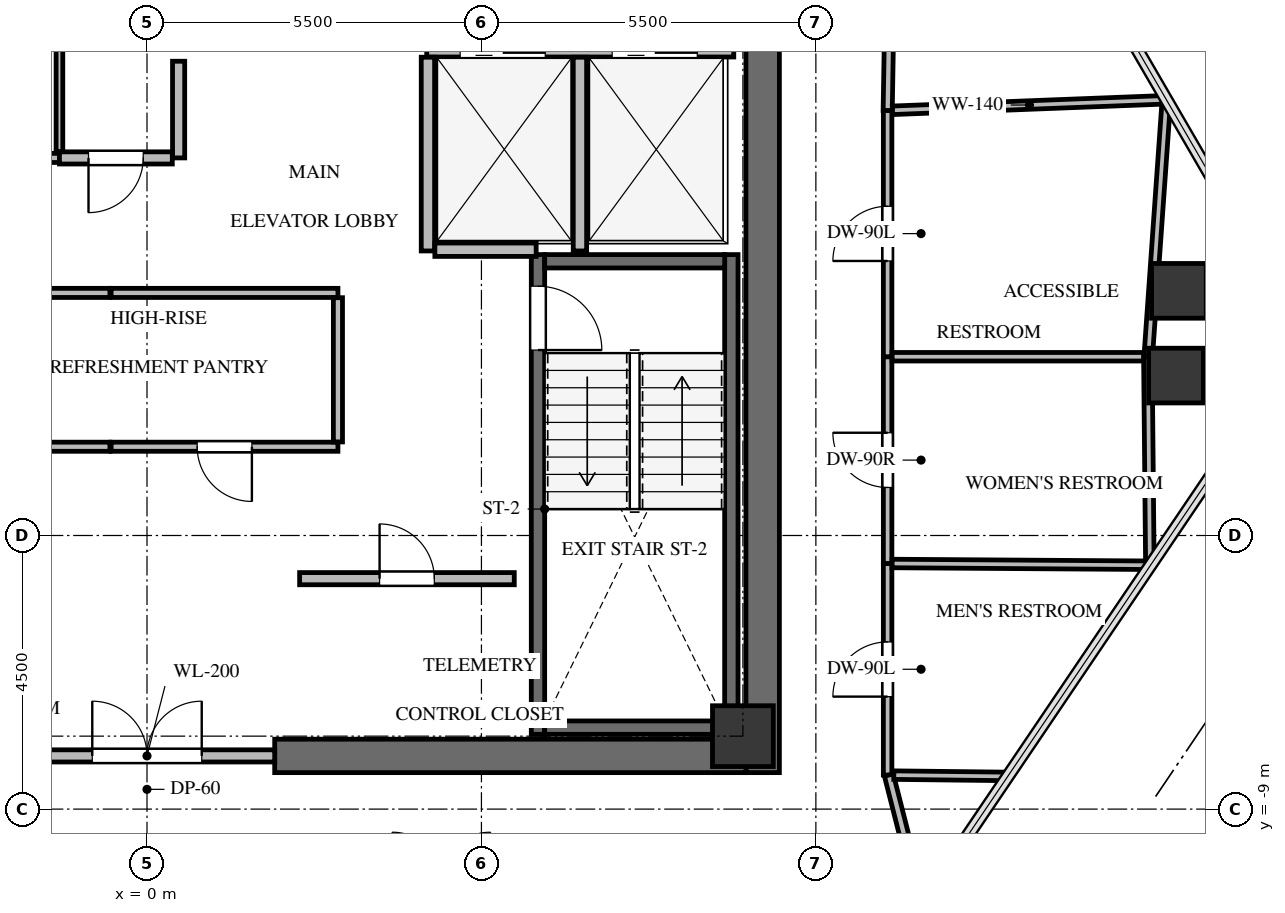
"""IFC4 building model, lengths in metres.
Left out: names, types, materials, properties, quantities, classifications, styles, units other than length and angle.
Written with IfcOpenShell. Run it as: python <this file> out.ifc"""

import sys

from ifc_helpers import new_model, si_unit, direction, frame, frame_2d, origin, origin_2d, place, context, subcontext, project, spatial, rectangle, extrude, source, transform, mapped, element, fill, save


model = new_model("IFC4")
c1 = context("Model", 3, precision=1e-05, world=origin(), true_north=direction((0.0, 1.0)))
c2 = subcontext(c1, "Body", "Model", "MODEL_VIEW")
j1 = project(units=[si_unit("LENGTHUNIT", "METRE"), si_unit("PLANEANGLEUNIT", "RADIAN")], contexts=[c1])
p1 = place(None, origin())
s1 = spatial("IfcSite", under=j1, at=p1, CompositionType="ELEMENT")
p2 = place(p1, origin())
s2 = spatial("IfcBuilding", under=s1, at=p2, CompositionType="ELEMENT")
p3 = place(p2, frame((0.0, 0.0, 244.7)))
s3 = spatial("IfcBuildingStorey", under=s2, at=p3, CompositionType="ELEMENT", Elevation=244.7)
p4 = place(p3, frame((10.125, -8.4, 0.0), z_axis=(0.0, 0.0, 1.0), x_axis=(0.0, 1.0, 0.0)))
e1 = element("IfcWall", 1, at=p4, inside=s3, PredefinedType="SHEAR", context=c2, shape_type="SweptSolid", body=[
    extrude(rectangle(XDim=16.8, YDim=0.55, at=frame_2d((8.4, 0.0))), origin(), (0.0, 0.0, 1.0), 3.3),
])
p5 = place(p3, frame((2.1, -8.125, 0.0), z_axis=(0.0, 0.0, 1.0), x_axis=(1.0, 0.0, 0.0)))
e2 = element("IfcWall", 2, at=p5, inside=s3, PredefinedType="SHEAR", context=c2, shape_type="SweptSolid", body=[
    extrude(rectangle(XDim=7.75, YDim=0.55, at=frame_2d((3.875, 0.0))), origin(), (0.0, 0.0, 1.0), 3.3),
])
p6 = place(p3, frame((9.61, -7.77, -0.24), z_axis=(0.0, 0.0, 1.0), x_axis=(0.0, 1.0, 0.0)))
e3 = element("IfcWall", 3, at=p6, inside=s3, PredefinedType="SHEAR", context=c2, shape_type="SweptSolid", body=[
    extrude(rectangle(XDim=7.89, YDim=0.22, at=frame_2d((3.945, 0.0))), origin(), (0.0, 0.0, 1.0), 3.3),
])
p7 = place(p3, frame((6.43, 0.12, -0.24), z_axis=(0.0, 0.0, 1.0), x_axis=(0.0, -1.0, 0.0)))
e4 = element("IfcWall", 4, at=p7, inside=s3, PredefinedType="SHEAR", context=c2, shape_type="SweptSolid", body=[
    extrude(rectangle(XDim=7.89, YDim=0.22, at=frame_2d((3.945, 0.0))), origin(), (0.0, 0.0, 1.0), 3.3),
])
p8 = place(p7, frame((0.52, 0.0, 0.0)))
e5 = element("IfcOpeningElement", 5, at=p8, cuts=e4, PredefinedType="OPENING", context=c2, shape_type="SweptSolid", body=[
    extrude(rectangle(XDim=1.05, YDim=2.15, at=frame_2d((0.525, 1.075))), frame((0.0, 0.12, 0.0), z_axis=(0.0, -1.0, 0.0), x_axis=(1.0, 0.0, 0.0)), (0.0, 0.0, 1.0), 0.24),
])
for number, where, z_axis, x_axis in (
    (6, (6.54, -7.66, -0.24), (0.0, 0.0, 1.0), (1.0, 0.0, 0.0)),
    (7, (9.5, 0.01, -0.24), (0.0, 0.0, 1.0), (-1.0, 0.0, 0.0)),
):
    element("IfcWall", number, at=place(p3, frame(where, z_axis=z_axis, x_axis=x_axis)), inside=s3, PredefinedType="SHEAR", context=c2, shape_type="SweptSolid", body=[
        extrude(rectangle(XDim=2.96, YDim=0.22, at=frame_2d((1.48, 0.0))), origin(), (0.0, 0.0, 1.0), 3.3),
    ])
m1 = source(origin(), c2, "Body", "SweptSolid", [
    extrude(rectangle(XDim=1.0, YDim=1.0, at=origin_2d()), origin(), (0.0, 0.0, 1.0), 3.3),
])
p9 = place(p3, frame((9.8, -7.8, -0.24), z_axis=(0.0, 0.0, 1.0), x_axis=(1.0, 0.0, 0.0)))
e8 = element("IfcColumn", 8, at=p9, inside=s3, PredefinedType="COLUMN", context=c2, shape_type="MappedRepresentation", body=[
    mapped(m1, transform((0.0, 0.0, 0.0), x_axis=(1.0, 0.0, 0.0), y_axis=(0.0, 1.0, 0.0), z_axis=(0.0, 0.0, 1.0), scale=1.0)),
])
m2 = source(origin(), c2, "Body", "SweptSolid", [
    extrude(rectangle(XDim=0.9, YDim=0.9, at=origin_2d()), origin(), (0.0, 0.0, 1.0), 3.3),
])
for number, where, z_axis, x_axis in (
    (9, (16.97, -0.476, -0.24), (0.0, 0.0, 1.0), (1.0, 0.0, 0.0)),
    (10, (16.922, -1.87, -0.24), (0.0, 0.0, 1.0), (1.0, 0.0, 0.0)),
):
    element("IfcColumn", number, at=place(p3, frame(where, z_axis=z_axis, x_axis=x_axis)), inside=s3, PredefinedType="COLUMN", context=c2, shape_type="MappedRepresentation", body=[
        mapped(m2, transform((0.0, 0.0, 0.0), x_axis=(1.0, 0.0, 0.0), y_axis=(0.0, 1.0, 0.0), z_axis=(0.0, 0.0, 1.0), scale=1.0)),
    ])
p10 = place(p3, frame((-2.1, -8.125, 0.0), z_axis=(0.0, 0.0, 1.0), x_axis=(1.0, 0.0, 0.0)))
e11 = element("IfcWall", 11, at=p10, inside=s3, PredefinedType="SOLIDWALL", context=c2, shape_type="SweptSolid", body=[
    extrude(rectangle(XDim=4.2, YDim=0.2, at=frame_2d((2.1, 0.0))), origin(), (0.0, 0.0, 1.0), 3.045),
])
p11 = place(p10, frame((1.2, 0.0, 0.0)))
e12 = element("IfcOpeningElement", 12, at=p11, cuts=e11, PredefinedType="OPENING", context=c2, shape_type="SweptSolid", body=[
    extrude(rectangle(XDim=1.8, YDim=2.15, at=frame_2d((0.9, 1.075))), frame((0.0, 0.11, 0.0), z_axis=(0.0, -1.0, 0.0), x_axis=(1.0, 0.0, 0.0)), (0.0, 0.0, 1.0), 0.22),
])
p12 = place(p3, frame((4.6, 3.48, 0.0), z_axis=(0.0, 0.0, 1.0), x_axis=(1.0, 0.0, 0.0)))
e13 = element("IfcWall", 13, at=p12, inside=s3, PredefinedType="SOLIDWALL", context=c2, shape_type="SweptSolid", body=[
    extrude(rectangle(XDim=5.05, YDim=0.22, at=frame_2d((2.525, 0.0))), origin(), (0.0, 0.0, 1.0), 3.045),
])
p13 = place(p12, frame((0.55, 0.0, 0.0)))
e14 = element("IfcOpeningElement", 14, at=p13, cuts=e13, PredefinedType="OPENING", context=c2, shape_type="SweptSolid", body=[
    extrude(rectangle(XDim=1.4, YDim=2.15, at=frame_2d((0.7, 1.075))), frame((0.0, 0.12, 0.0), z_axis=(0.0, -1.0, 0.0), x_axis=(1.0, 0.0, 0.0)), (0.0, 0.0, 1.0), 0.24),
])
p14 = place(p12, frame((3.05, 0.0, 0.0)))
e15 = element("IfcOpeningElement", 15, at=p14, cuts=e13, PredefinedType="OPENING", context=c2, shape_type="SweptSolid", body=[
    extrude(rectangle(XDim=1.4, YDim=2.15, at=frame_2d((0.7, 1.075))), frame((0.0, 0.12, 0.0), z_axis=(0.0, -1.0, 0.0), x_axis=(1.0, 0.0, 0.0)), (0.0, 0.0, 1.0), 0.24),
])
for number, where, z_axis, x_axis in (
    (16, (4.62, 0.18, 0.0), (0.0, 0.0, 1.0), (0.0, 1.0, 0.0)),
    (17, (7.12, 0.18, 0.0), (0.0, 0.0, 1.0), (0.0, 1.0, 0.0)),
):
    element("IfcWall", number, at=place(p3, frame(where, z_axis=z_axis, x_axis=x_axis)), inside=s3, PredefinedType="SOLIDWALL", context=c2, shape_type="SweptSolid", body=[
        extrude(rectangle(XDim=3.186, YDim=0.22, at=frame_2d((1.593, 0.0))), origin(), (0.0, 0.0, 1.0), 3.045),
    ])
p15 = place(p3, frame((4.734, 0.2, 0.0), z_axis=(0.0, 0.0, 1.0), x_axis=(1.0, 0.0, 0.0)))
e18 = element("IfcWall", 18, at=p15, inside=s3, PredefinedType="SOLIDWALL", context=c2, shape_type="SweptSolid", body=[
    extrude(rectangle(XDim=1.666, YDim=0.22, at=frame_2d((0.833, 0.0))), origin(), (0.0, 0.0, 1.0), 3.045),
])
p16 = place(p3, frame((2.51, -5.21, 0.0), z_axis=(0.0, 0.0, 1.0), x_axis=(1.0, 0.0, 0.0)))
e19 = element("IfcWall", 19, at=p16, inside=s3, PredefinedType="SOLIDWALL", context=c2, shape_type="SweptSolid", body=[
    extrude(rectangle(XDim=3.53, YDim=0.2, at=frame_2d((1.765, 0.0))), origin(), (0.0, 0.0, 1.0), 3.045),
])
p17 = place(p16, frame((1.315, 0.0, 0.0)))
e20 = element("IfcOpeningElement", 20, at=p17, cuts=e19, PredefinedType="OPENING", context=c2, shape_type="SweptSolid", body=[
    extrude(rectangle(XDim=0.9, YDim=2.05, at=frame_2d((0.45, 1.025))), frame((0.0, 0.11, 0.0), z_axis=(0.0, -1.0, 0.0), x_axis=(1.0, 0.0, 0.0)), (0.0, 0.0, 1.0), 0.22),
])
p18 = place(p3, frame((-0.61, -3.04, 0.0), z_axis=(0.0, 0.0, 1.0), x_axis=(-1.0, 0.0, 0.0)))
e21 = element("IfcWall", 21, at=p18, inside=s3, PredefinedType="PARTITIONING", context=c2, shape_type="SweptSolid", body=[
    extrude(rectangle(XDim=3.73, YDim=0.15, at=frame_2d((1.865, 0.0))), origin(), (0.0, 0.0, 1.0), 3.045),
])
p19 = place(p18, frame((1.415, 0.0, 0.0)))
e22 = element("IfcOpeningElement", 22, at=p19, cuts=e21, PredefinedType="OPENING", context=c2, shape_type="SweptSolid", body=[
    extrude(rectangle(XDim=0.9, YDim=2.05, at=frame_2d((0.45, 1.025))), frame((0.0, 0.085, 0.0), z_axis=(0.0, -1.0, 0.0), x_axis=(1.0, 0.0, 0.0)), (0.0, 0.0, 1.0), 0.17),
])
p20 = place(p3, frame((-4.34, -0.51, 0.0), z_axis=(0.0, 0.0, 1.0), x_axis=(1.0, 0.0, 0.0)))
e23 = element("IfcWall", 23, at=p20, inside=s3, PredefinedType="PARTITIONING", context=c2, shape_type="SweptSolid", body=[
    extrude(rectangle(XDim=3.73, YDim=0.15, at=frame_2d((1.865, 0.0))), origin(), (0.0, 0.0, 1.0), 3.045),
])
p21 = place(p3, frame((3.14, -3.04, 0.0), z_axis=(0.0, 0.0, 1.0), x_axis=(-1.0, 0.0, 0.0)))
e24 = element("IfcWall", 24, at=p21, inside=s3, PredefinedType="PARTITIONING", context=c2, shape_type="SweptSolid", body=[
    extrude(rectangle(XDim=3.73, YDim=0.15, at=frame_2d((1.865, 0.0))), origin(), (0.0, 0.0, 1.0), 3.045),
])
p22 = place(p21, frame((1.415, 0.0, 0.0)))
e25 = element("IfcOpeningElement", 25, at=p22, cuts=e24, PredefinedType="OPENING", context=c2, shape_type="SweptSolid", body=[
    extrude(rectangle(XDim=0.9, YDim=2.05, at=frame_2d((0.45, 1.025))), frame((0.0, 0.085, 0.0), z_axis=(0.0, -1.0, 0.0), x_axis=(1.0, 0.0, 0.0)), (0.0, 0.0, 1.0), 0.17),
])
p23 = place(p3, frame((-0.59, -0.51, 0.0), z_axis=(0.0, 0.0, 1.0), x_axis=(1.0, 0.0, 0.0)))
e26 = element("IfcWall", 26, at=p23, inside=s3, PredefinedType="PARTITIONING", context=c2, shape_type="SweptSolid", body=[
    extrude(rectangle(XDim=3.73, YDim=0.15, at=frame_2d((1.865, 0.0))), origin(), (0.0, 0.0, 1.0), 3.045),
])
p24 = place(p3, frame((3.14, -0.589, 0.0), z_axis=(0.0, 0.0, 1.0), x_axis=(0.0, -1.0, 0.0)))
e27 = element("IfcWall", 27, at=p24, inside=s3, PredefinedType="PARTITIONING", context=c2, shape_type="SweptSolid", body=[
    extrude(rectangle(XDim=2.372, YDim=0.15, at=frame_2d((1.186, 0.0))), origin(), (0.0, 0.0, 1.0), 3.045),
])
p25 = place(p3, frame((-1.44, 1.71, 0.0), z_axis=(0.0, 0.0, 1.0), x_axis=(-1.0, 0.0, 0.0)))
e28 = element("IfcWall", 28, at=p25, inside=s3, PredefinedType="PARTITIONING", context=c2, shape_type="SweptSolid", body=[
    extrude(rectangle(XDim=1.96, YDim=0.15, at=frame_2d((0.98, 0.0))), origin(), (0.0, 0.0, 1.0), 3.045),
])
p26 = place(p25, frame((0.53, 0.0, 0.0)))
e29 = element("IfcOpeningElement", 29, at=p26, cuts=e28, PredefinedType="OPENING", context=c2, shape_type="SweptSolid", body=[
    extrude(rectangle(XDim=0.9, YDim=2.05, at=frame_2d((0.45, 1.025))), frame((0.0, 0.085, 0.0), z_axis=(0.0, -1.0, 0.0), x_axis=(1.0, 0.0, 0.0)), (0.0, 0.0, 1.0), 0.17),
])
p27 = place(p3, frame((0.52, 3.3, 0.0), z_axis=(0.0, 0.0, 1.0), x_axis=(0.0, -1.0, 0.0)))
e30 = element("IfcWall", 30, at=p27, inside=s3, PredefinedType="SOLIDWALL", context=c2, shape_type="SweptSolid", body=[
    extrude(rectangle(XDim=1.59, YDim=0.2, at=frame_2d((0.795, 0.0))), origin(), (0.0, 0.0, 1.0), 3.045),
])
p28 = place(p3, frame((0.416, 1.71, 0.0), z_axis=(0.0, 0.0, 1.0), x_axis=(-1.0, 0.0, 0.0)))
e31 = element("IfcWall", 31, at=p28, inside=s3, PredefinedType="SOLIDWALL", context=c2, shape_type="SweptSolid", body=[
    extrude(rectangle(XDim=1.856, YDim=0.2, at=frame_2d((0.928, 0.0))), origin(), (0.0, 0.0, 1.0), 3.045),
])
p29 = place(p28, frame((0.478, 0.0, 0.0)))
e32 = element("IfcOpeningElement", 32, at=p29, cuts=e31, PredefinedType="OPENING", context=c2, shape_type="SweptSolid", body=[
    extrude(rectangle(XDim=0.9, YDim=2.05, at=frame_2d((0.45, 1.025))), frame((0.0, 0.11, 0.0), z_axis=(0.0, -1.0, 0.0), x_axis=(1.0, 0.0, 0.0)), (0.0, 0.0, 1.0), 0.22),
])
p30 = place(p3, frame((12.18, -8.44, 0.0), z_axis=(0.0, 0.0, 1.0), x_axis=(0.0, 1.0, 0.0)))
e33 = element("IfcWall", 33, at=p30, inside=s3, PredefinedType="PARTITIONING", context=c2, shape_type="SweptSolid", body=[
    extrude(rectangle(XDim=3.48, YDim=0.14, at=frame_2d((1.74, 0.0))), origin(), (0.0, 0.0, 1.0), 2.399),
])
p31 = place(p30, frame((1.29, 0.0, 0.0)))
e34 = element("IfcOpeningElement", 34, at=p31, cuts=e33, PredefinedType="OPENING", context=c2, shape_type="SweptSolid", body=[
    extrude(rectangle(XDim=0.9, YDim=2.05, at=frame_2d((0.45, 1.025))), frame((0.0, 0.08, 0.0), z_axis=(0.0, -1.0, 0.0), x_axis=(1.0, 0.0, 0.0)), (0.0, 0.0, 1.0), 0.16),
])
p32 = place(p3, frame((12.18, -4.96, 0.0), z_axis=(0.0, 0.0, 1.0), x_axis=(0.0, 1.0, 0.0)))
e35 = element("IfcWall", 35, at=p32, inside=s3, PredefinedType="PARTITIONING", context=c2, shape_type="SweptSolid", body=[
    extrude(rectangle(XDim=3.4, YDim=0.14, at=frame_2d((1.7, 0.0))), origin(), (0.0, 0.0, 1.0), 3.045),
])
p33 = place(p32, frame((1.25, 0.0, 0.0)))
e36 = element("IfcOpeningElement", 36, at=p33, cuts=e35, PredefinedType="OPENING", context=c2, shape_type="SweptSolid", body=[
    extrude(rectangle(XDim=0.9, YDim=2.05, at=frame_2d((0.45, 1.025))), frame((0.0, 0.08, 0.0), z_axis=(0.0, -1.0, 0.0), x_axis=(1.0, 0.0, 0.0)), (0.0, 0.0, 1.0), 0.16),
])
p34 = place(p3, frame((12.18, -1.56, 0.0), z_axis=(0.0, 0.0, 1.0), x_axis=(0.0, 1.0, 0.0)))
e37 = element("IfcWall", 37, at=p34, inside=s3, PredefinedType="PARTITIONING", context=c2, shape_type="SweptSolid", body=[
    extrude(rectangle(XDim=4.05, YDim=0.14, at=frame_2d((2.025, 0.0))), origin(), (0.0, 0.0, 1.0), 2.301),
])
p35 = place(p34, frame((1.575, 0.0, 0.0)))
e38 = element("IfcOpeningElement", 38, at=p35, cuts=e37, PredefinedType="OPENING", context=c2, shape_type="SweptSolid", body=[
    extrude(rectangle(XDim=0.9, YDim=2.05, at=frame_2d((0.45, 1.025))), frame((0.0, 0.08, 0.0), z_axis=(0.0, -1.0, 0.0), x_axis=(1.0, 0.0, 0.0)), (0.0, 0.0, 1.0), 0.16),
])
p36 = place(p3, frame((12.719, -10.477, 0.0), z_axis=(0.0, 0.0, 1.0), x_axis=(-0.246550381988, 0.96912997536, 0.0)))
e39 = element("IfcWall", 39, at=p36, inside=s3, PredefinedType="PARTITIONING", context=c2, shape_type="SweptSolid", body=[
    extrude(rectangle(XDim=2.102, YDim=0.15, at=frame_2d((1.051, 0.0))), origin(), (0.0, 0.0, 1.0), 2.399),
])
p37 = place(p3, frame((12.181, 2.49, 0.0), z_axis=(0.0, 0.0, 1.0), x_axis=(0.016828134389, 0.999858396921, 0.0)))
e40 = element("IfcWall", 40, at=p37, inside=s3, PredefinedType="PARTITIONING", context=c2, shape_type="SweptSolid", body=[
    extrude(rectangle(XDim=7.675, YDim=0.15, at=frame_2d((3.837, 0.0))), origin(), (0.0, 0.0, 1.0), 2.399),
])
p38 = place(p37, frame((3.362, 0.0, 0.0)))
e41 = element("IfcOpeningElement", 41, at=p38, cuts=e40, PredefinedType="OPENING", context=c2, shape_type="SweptSolid", body=[
    extrude(rectangle(XDim=0.95, YDim=2.1, at=frame_2d((0.475, 1.05))), frame((0.0, 0.085, 0.0), z_axis=(0.0, -1.0, 0.0), x_axis=(1.0, 0.0, 0.0)), (0.0, 0.0, 1.0), 0.17),
])
p39 = place(p3, frame((-1.44, 4.375, 0.0), z_axis=(0.0, 0.0, 1.0), x_axis=(0.0, -1.0, 0.0)))
e42 = element("IfcWall", 42, at=p39, inside=s3, PredefinedType="MOVABLE", context=c2, shape_type="SweptSolid", body=[
    extrude(rectangle(XDim=2.561, YDim=0.11, at=frame_2d((1.281, 0.0))), origin(), (0.0, 0.0, 1.0), 3.045),
])
p40 = place(p3, frame((12.254, -4.96, 0.0), z_axis=(0.0, 0.0, 1.0), x_axis=(0.999976630429, -0.006836563198, 0.0)))
e43 = element("IfcWall", 43, at=p40, inside=s3, PredefinedType="PARTITIONING", context=c2, shape_type="SweptSolid", body=[
    extrude(rectangle(XDim=4.25, YDim=0.14, at=frame_2d((2.125, 0.0))), origin(), (0.0, 0.0, 1.0), 2.399),
])
p41 = place(p3, frame((14.156, -8.462, 0.0), z_axis=(0.0, 0.0, 1.0), x_axis=(-0.999935742613, 0.011336253532, 0.0)))
e44 = element("IfcWall", 44, at=p41, inside=s3, PredefinedType="PARTITIONING", context=c2, shape_type="SweptSolid", body=[
    extrude(rectangle(XDim=1.874, YDim=0.14, at=frame_2d((0.937, 0.0))), origin(), (0.0, 0.0, 1.0), 2.399),
])
p42 = place(p3, frame((12.254, -1.56, 0.0), z_axis=(0.0, 0.0, 1.0), x_axis=(1.0, 0.0, 0.0)))
e45 = element("IfcWall", 45, at=p42, inside=s3, PredefinedType="PARTITIONING", context=c2, shape_type="SweptSolid", body=[
    extrude(rectangle(XDim=4.206, YDim=0.14, at=frame_2d((2.103, 0.0))), origin(), (0.0, 0.0, 1.0), 2.301),
])
p43 = place(p3, frame((16.46, -1.56, 0.0), z_axis=(0.0, 0.0, 1.0), x_axis=(0.009604446748, -0.999953876238, 0.0)))
e46 = element("IfcWall", 46, at=p43, inside=s3, PredefinedType="PARTITIONING", context=c2, shape_type="SweptSolid", body=[
    extrude(rectangle(XDim=3.355, YDim=0.14, at=frame_2d((1.678, 0.0))), origin(), (0.0, 0.0, 1.0), 2.301),
])
p44 = place(p3, frame((12.26, 2.493, 0.0), z_axis=(0.0, 0.0, 1.0), x_axis=(0.999256206289, 0.038562082324, 0.0)))
e47 = element("IfcWall", 47, at=p44, inside=s3, PredefinedType="PARTITIONING", context=c2, shape_type="SweptSolid", body=[
    extrude(rectangle(XDim=4.508, YDim=0.14, at=frame_2d((2.254, 0.0))), origin(), (0.0, 0.0, 1.0), 2.399),
])
p45 = place(p3, frame((16.76, 2.593, 0.0), z_axis=(0.0, 0.0, 1.0), x_axis=(-0.07055102187, -0.997508172053, 0.0)))
e48 = element("IfcWall", 48, at=p45, inside=s3, PredefinedType="PARTITIONING", context=c2, shape_type="SweptSolid", body=[
    extrude(rectangle(XDim=4.163, YDim=0.14, at=frame_2d((2.082, 0.0))), origin(), (0.0, 0.0, 1.0), 2.301),
])
m3 = source(origin(), c2, "Body", "SweptSolid", [
    extrude(rectangle(XDim=1.05, YDim=2.15, at=frame_2d((0.525, 1.075))), frame((0.0, 0.025, 0.0), z_axis=(0.0, -1.0, 0.0), x_axis=(1.0, 0.0, 0.0)), (0.0, 0.0, 1.0), 0.05),
])
p46 = place(p8, origin())
e49 = element("IfcDoor", 49, at=p46, inside=s3, OperationType="SINGLE_SWING_RIGHT", PredefinedType="DOOR", context=c2, shape_type="MappedRepresentation", body=[
    mapped(m3, transform((0.0, 0.0, 0.0), x_axis=(1.0, 0.0, 0.0), y_axis=(0.0, 1.0, 0.0), z_axis=(0.0, 0.0, 1.0), scale=1.0)),
])
fill(e5, e49)
m4 = source(origin(), c2, "Body", "SweptSolid", [
    extrude(rectangle(XDim=1.8, YDim=2.15, at=frame_2d((0.9, 1.075))), frame((0.0, 0.025, 0.0), z_axis=(0.0, -1.0, 0.0), x_axis=(1.0, 0.0, 0.0)), (0.0, 0.0, 1.0), 0.05),
])
p47 = place(p11, origin())
e50 = element("IfcDoor", 50, at=p47, inside=s3, OperationType="DOUBLE_DOOR_SINGLE_SWING", PredefinedType="DOOR", context=c2, shape_type="MappedRepresentation", body=[
    mapped(m4, transform((0.0, 0.0, 0.0), x_axis=(1.0, 0.0, 0.0), y_axis=(0.0, 1.0, 0.0), z_axis=(0.0, 0.0, 1.0), scale=1.0)),
])
fill(e12, e50)
m5 = source(origin(), c2, "Body", "SweptSolid", [
    extrude(rectangle(XDim=0.9, YDim=2.05, at=frame_2d((0.45, 1.025))), frame((0.0, 0.025, 0.0), z_axis=(0.0, -1.0, 0.0), x_axis=(1.0, 0.0, 0.0)), (0.0, 0.0, 1.0), 0.05),
])
p48 = place(p17, origin())
e51 = element("IfcDoor", 51, at=p48, inside=s3, OperationType="SINGLE_SWING_LEFT", PredefinedType="DOOR", context=c2, shape_type="MappedRepresentation", body=[
    mapped(m5, transform((0.0, 0.0, 0.0), x_axis=(1.0, 0.0, 0.0), y_axis=(0.0, 1.0, 0.0), z_axis=(0.0, 0.0, 1.0), scale=1.0)),
])
fill(e20, e51)
p49 = place(p22, origin())
e52 = element("IfcDoor", 52, at=p49, inside=s3, OperationType="SINGLE_SWING_LEFT", PredefinedType="DOOR", context=c2, shape_type="MappedRepresentation", body=[
    mapped(m5, transform((0.0, 0.0, 0.0), x_axis=(1.0, 0.0, 0.0), y_axis=(0.0, 1.0, 0.0), z_axis=(0.0, 0.0, 1.0), scale=1.0)),
])
fill(e25, e52)
m6 = source(origin(), c2, "Body", "SweptSolid", [
    extrude(rectangle(XDim=0.9, YDim=2.05, at=frame_2d((0.45, 1.025))), frame((0.0, 0.025, 0.0), z_axis=(0.0, -1.0, 0.0), x_axis=(1.0, 0.0, 0.0)), (0.0, 0.0, 1.0), 0.05),
])
p50 = place(p29, origin())
e53 = element("IfcDoor", 53, at=p50, inside=s3, OperationType="SINGLE_SWING_RIGHT", PredefinedType="DOOR", context=c2, shape_type="MappedRepresentation", body=[
    mapped(m6, transform((0.0, 0.0, 0.0), x_axis=(1.0, 0.0, 0.0), y_axis=(0.0, 1.0, 0.0), z_axis=(0.0, 0.0, 1.0), scale=1.0)),
])
fill(e32, e53)
m7 = source(origin(), c2, "Body", "SweptSolid", [
    extrude(rectangle(XDim=0.9, YDim=2.05, at=frame_2d((0.45, 1.025))), frame((0.0, 0.025, 0.0), z_axis=(0.0, -1.0, 0.0), x_axis=(1.0, 0.0, 0.0)), (0.0, 0.0, 1.0), 0.05),
])
p51 = place(p31, origin())
e54 = element("IfcDoor", 54, at=p51, inside=s3, OperationType="SINGLE_SWING_LEFT", PredefinedType="DOOR", context=c2, shape_type="MappedRepresentation", body=[
    mapped(m7, transform((0.0, 0.0, 0.0), x_axis=(1.0, 0.0, 0.0), y_axis=(0.0, 1.0, 0.0), z_axis=(0.0, 0.0, 1.0), scale=1.0)),
])
fill(e34, e54)
m8 = source(origin(), c2, "Body", "SweptSolid", [
    extrude(rectangle(XDim=0.9, YDim=2.05, at=frame_2d((0.45, 1.025))), frame((0.0, 0.025, 0.0), z_axis=(0.0, -1.0, 0.0), x_axis=(1.0, 0.0, 0.0)), (0.0, 0.0, 1.0), 0.05),
])
p52 = place(p33, origin())
e55 = element("IfcDoor", 55, at=p52, inside=s3, OperationType="SINGLE_SWING_RIGHT", PredefinedType="DOOR", context=c2, shape_type="MappedRepresentation", body=[
    mapped(m8, transform((0.0, 0.0, 0.0), x_axis=(1.0, 0.0, 0.0), y_axis=(0.0, 1.0, 0.0), z_axis=(0.0, 0.0, 1.0), scale=1.0)),
])
fill(e36, e55)
p53 = place(p35, origin())
e56 = element("IfcDoor", 56, at=p53, inside=s3, OperationType="SINGLE_SWING_LEFT", PredefinedType="DOOR", context=c2, shape_type="MappedRepresentation", body=[
    mapped(m7, transform((0.0, 0.0, 0.0), x_axis=(1.0, 0.0, 0.0), y_axis=(0.0, 1.0, 0.0), z_axis=(0.0, 0.0, 1.0), scale=1.0)),
])
fill(e38, e56)
save(model, sys.argv[1])
